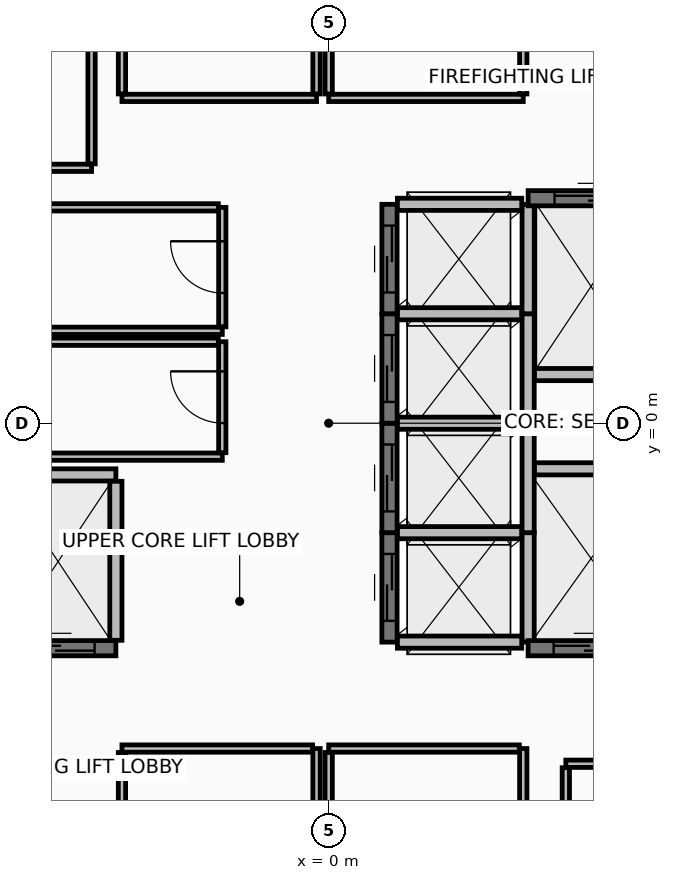
"""IFC4 building model, lengths in metres.
Left out: names, types, materials, properties, quantities, classifications, styles, units other than length and angle.
Written with IfcOpenShell. Run it as: python <this file> out.ifc"""

import sys

from ifc_helpers import new_model, si_unit, direction, frame, frame_2d, origin, place, context, subcontext, project, spatial, rectangle, extrude, element, fill, save


model = new_model("IFC4")
c1 = context("Model", 3, precision=1e-05, world=origin(), true_north=direction((0.0, 1.0)))
c2 = subcontext(c1, "Body", "Model", "MODEL_VIEW")
j1 = project(units=[si_unit("LENGTHUNIT", "METRE"), si_unit("PLANEANGLEUNIT", "RADIAN")], contexts=[c1])
p1 = place(None, origin())
s1 = spatial("IfcSite", under=j1, at=p1, CompositionType="ELEMENT")
p2 = place(p1, origin())
s2 = spatial("IfcBuilding", under=s1, at=p2, CompositionType="ELEMENT")
p3 = place(p2, frame((0.0, 0.0, 294.35)))
s3 = spatial("IfcBuildingStorey", under=s2, at=p3, CompositionType="ELEMENT", Elevation=294.35)
p4 = place(p3, frame((1.0, -3.6, 0.0), z_axis=(0.0, 0.0, 1.0), x_axis=(0.0, 1.0, 0.0)))
e1 = element("IfcWall", 1, at=p4, inside=s3, PredefinedType="SHEAR", context=c2, shape_type="SweptSolid", body=[
    extrude(rectangle(XDim=1.8, YDim=0.25, at=frame_2d((0.9, 0.0))), origin(), (0.0, 0.0, 1.0), 3.45),
])
p5 = place(p4, frame((0.35, 0.0, 0.0)))
e2 = element("IfcOpeningElement", 2, at=p5, cuts=e1, PredefinedType="OPENING", context=c2, shape_type="SweptSolid", body=[
    extrude(rectangle(XDim=1.1, YDim=2.2, at=frame_2d((0.55, 1.1))), frame((0.0, 0.135, 0.0), z_axis=(0.0, -1.0, 0.0), x_axis=(1.0, 0.0, 0.0)), (0.0, 0.0, 1.0), 0.27),
])
p6 = place(p3, frame((3.28, -3.6, 0.0), z_axis=(0.0, 0.0, 1.0), x_axis=(0.0, 1.0, 0.0)))
e3 = element("IfcWall", 3, at=p6, inside=s3, PredefinedType="PARTITIONING", context=c2, shape_type="SweptSolid", body=[
    extrude(rectangle(XDim=1.8, YDim=0.2, at=frame_2d((0.9, 0.0))), origin(), (0.0, 0.0, 1.0), 3.45),
])
for number, where, z_axis, x_axis in (
    (4, (1.13, -3.6, 0.0), (0.0, 0.0, 1.0), (1.0, 0.0, 0.0)),
    (5, (1.13, -1.8, 0.0), (0.0, 0.0, 1.0), (1.0, 0.0, 0.0)),
):
    element("IfcWall", number, at=place(p3, frame(where, z_axis=z_axis, x_axis=x_axis)), inside=s3, PredefinedType="PARTITIONING", context=c2, shape_type="SweptSolid", body=[
        extrude(rectangle(XDim=2.045, YDim=0.2, at=frame_2d((1.022, 0.0))), origin(), (0.0, 0.0, 1.0), 3.45),
    ])
p7 = place(p3, frame((1.0, -1.8, 0.0), z_axis=(0.0, 0.0, 1.0), x_axis=(0.0, 1.0, 0.0)))
e6 = element("IfcWall", 6, at=p7, inside=s3, PredefinedType="SHEAR", context=c2, shape_type="SweptSolid", body=[
    extrude(rectangle(XDim=1.8, YDim=0.25, at=frame_2d((0.9, 0.0))), origin(), (0.0, 0.0, 1.0), 3.45),
])
p8 = place(p7, frame((0.35, 0.0, 0.0)))
e7 = element("IfcOpeningElement", 7, at=p8, cuts=e6, PredefinedType="OPENING", context=c2, shape_type="SweptSolid", body=[
    extrude(rectangle(XDim=1.1, YDim=2.2, at=frame_2d((0.55, 1.1))), frame((0.0, 0.135, 0.0), z_axis=(0.0, -1.0, 0.0), x_axis=(1.0, 0.0, 0.0)), (0.0, 0.0, 1.0), 0.27),
])
p9 = place(p3, frame((3.28, -1.8, 0.0), z_axis=(0.0, 0.0, 1.0), x_axis=(0.0, 1.0, 0.0)))
e8 = element("IfcWall", 8, at=p9, inside=s3, PredefinedType="PARTITIONING", context=c2, shape_type="SweptSolid", body=[
    extrude(rectangle(XDim=1.8, YDim=0.2, at=frame_2d((0.9, 0.0))), origin(), (0.0, 0.0, 1.0), 3.45),
])
p10 = place(p3, frame((1.13, 0.0, 0.0), z_axis=(0.0, 0.0, 1.0), x_axis=(1.0, 0.0, 0.0)))
e9 = element("IfcWall", 9, at=p10, inside=s3, PredefinedType="PARTITIONING", context=c2, shape_type="SweptSolid", body=[
    extrude(rectangle(XDim=2.045, YDim=0.2, at=frame_2d((1.022, 0.0))), origin(), (0.0, 0.0, 1.0), 3.45),
])
p11 = place(p3, frame((1.0, 0.0, 0.0), z_axis=(0.0, 0.0, 1.0), x_axis=(0.0, 1.0, 0.0)))
e10 = element("IfcWall", 10, at=p11, inside=s3, PredefinedType="SHEAR", context=c2, shape_type="SweptSolid", body=[
    extrude(rectangle(XDim=1.8, YDim=0.25, at=frame_2d((0.9, 0.0))), origin(), (0.0, 0.0, 1.0), 3.45),
])
p12 = place(p11, frame((0.35, 0.0, 0.0)))
e11 = element("IfcOpeningElement", 11, at=p12, cuts=e10, PredefinedType="OPENING", context=c2, shape_type="SweptSolid", body=[
    extrude(rectangle(XDim=1.1, YDim=2.2, at=frame_2d((0.55, 1.1))), frame((0.0, 0.135, 0.0), z_axis=(0.0, -1.0, 0.0), x_axis=(1.0, 0.0, 0.0)), (0.0, 0.0, 1.0), 0.27),
])
p13 = place(p3, frame((3.28, 0.0, 0.0), z_axis=(0.0, 0.0, 1.0), x_axis=(0.0, 1.0, 0.0)))
e12 = element("IfcWall", 12, at=p13, inside=s3, PredefinedType="PARTITIONING", context=c2, shape_type="SweptSolid", body=[
    extrude(rectangle(XDim=1.8, YDim=0.2, at=frame_2d((0.9, 0.0))), origin(), (0.0, 0.0, 1.0), 3.45),
])
p14 = place(p3, frame((1.13, 1.8, 0.0), z_axis=(0.0, 0.0, 1.0), x_axis=(1.0, 0.0, 0.0)))
e13 = element("IfcWall", 13, at=p14, inside=s3, PredefinedType="PARTITIONING", context=c2, shape_type="SweptSolid", body=[
    extrude(rectangle(XDim=2.045, YDim=0.2, at=frame_2d((1.022, 0.0))), origin(), (0.0, 0.0, 1.0), 3.45),
])
p15 = place(p3, frame((1.0, 1.8, 0.0), z_axis=(0.0, 0.0, 1.0), x_axis=(0.0, 1.0, 0.0)))
e14 = element("IfcWall", 14, at=p15, inside=s3, PredefinedType="SHEAR", context=c2, shape_type="SweptSolid", body=[
    extrude(rectangle(XDim=1.8, YDim=0.25, at=frame_2d((0.9, 0.0))), origin(), (0.0, 0.0, 1.0), 3.45),
])
p16 = place(p15, frame((0.35, 0.0, 0.0)))
e15 = element("IfcOpeningElement", 15, at=p16, cuts=e14, PredefinedType="OPENING", context=c2, shape_type="SweptSolid", body=[
    extrude(rectangle(XDim=1.1, YDim=2.2, at=frame_2d((0.55, 1.1))), frame((0.0, 0.135, 0.0), z_axis=(0.0, -1.0, 0.0), x_axis=(1.0, 0.0, 0.0)), (0.0, 0.0, 1.0), 0.27),
])
p17 = place(p3, frame((3.28, 1.8, 0.0), z_axis=(0.0, 0.0, 1.0), x_axis=(0.0, 1.0, 0.0)))
e16 = element("IfcWall", 16, at=p17, inside=s3, PredefinedType="PARTITIONING", context=c2, shape_type="SweptSolid", body=[
    extrude(rectangle(XDim=1.8, YDim=0.2, at=frame_2d((0.9, 0.0))), origin(), (0.0, 0.0, 1.0), 3.45),
])
p18 = place(p3, frame((1.13, 3.6, 0.0), z_axis=(0.0, 0.0, 1.0), x_axis=(1.0, 0.0, 0.0)))
e17 = element("IfcWall", 17, at=p18, inside=s3, PredefinedType="PARTITIONING", context=c2, shape_type="SweptSolid", body=[
    extrude(rectangle(XDim=2.045, YDim=0.2, at=frame_2d((1.022, 0.0))), origin(), (0.0, 0.0, 1.0), 2.745),
])
p19 = place(p3, frame((-5.4, -3.7, 0.0), z_axis=(0.0, 0.0, 1.0), x_axis=(1.0, 0.0, 0.0)))
e18 = element("IfcWall", 18, at=p19, inside=s3, PredefinedType="SHEAR", context=c2, shape_type="SweptSolid", body=[
    extrude(rectangle(XDim=1.9, YDim=0.25, at=frame_2d((0.95, 0.0))), origin(), (0.0, 0.0, 1.0), 3.45),
])
p20 = place(p19, frame((0.35, 0.0, 0.0)))
e19 = element("IfcOpeningElement", 19, at=p20, cuts=e18, PredefinedType="OPENING", context=c2, shape_type="SweptSolid", body=[
    extrude(rectangle(XDim=1.2, YDim=2.2, at=frame_2d((0.6, 1.1))), frame((0.0, 0.135, 0.0), z_axis=(0.0, -1.0, 0.0), x_axis=(1.0, 0.0, 0.0)), (0.0, 0.0, 1.0), 0.27),
])
p21 = place(p3, frame((-5.27, -0.85, 0.0), z_axis=(0.0, 0.0, 1.0), x_axis=(1.0, 0.0, 0.0)))
e20 = element("IfcWall", 20, at=p21, inside=s3, PredefinedType="PARTITIONING", context=c2, shape_type="SweptSolid", body=[
    extrude(rectangle(XDim=1.77, YDim=0.2, at=frame_2d((0.885, 0.0))), origin(), (0.0, 0.0, 1.0), 3.45),
])
p22 = place(p3, frame((-3.5, -3.57, 0.0), z_axis=(0.0, 0.0, 1.0), x_axis=(0.0, 1.0, 0.0)))
e21 = element("IfcWall", 21, at=p22, inside=s3, PredefinedType="PARTITIONING", context=c2, shape_type="SweptSolid", body=[
    extrude(rectangle(XDim=2.615, YDim=0.2, at=frame_2d((1.308, 0.0))), origin(), (0.0, 0.0, 1.0), 3.45),
])
p23 = place(p3, frame((3.28, 3.7, 0.0), z_axis=(0.0, 0.0, 1.0), x_axis=(1.0, 0.0, 0.0)))
e22 = element("IfcWall", 22, at=p23, inside=s3, PredefinedType="SHEAR", context=c2, shape_type="SweptSolid", body=[
    extrude(rectangle(XDim=2.07, YDim=0.25, at=frame_2d((1.035, 0.0))), origin(), (0.0, 0.0, 1.0), 3.45),
])
p24 = place(p23, frame((0.435, 0.0, 0.0)))
e23 = element("IfcOpeningElement", 23, at=p24, cuts=e22, PredefinedType="OPENING", context=c2, shape_type="SweptSolid", body=[
    extrude(rectangle(XDim=1.2, YDim=2.2, at=frame_2d((0.6, 1.1))), frame((0.0, 0.135, 0.0), z_axis=(0.0, -1.0, 0.0), x_axis=(1.0, 0.0, 0.0)), (0.0, 0.0, 1.0), 0.27),
])
p25 = place(p3, frame((3.385, 0.8, 0.0), z_axis=(0.0, 0.0, 1.0), x_axis=(1.0, 0.0, 0.0)))
e24 = element("IfcWall", 24, at=p25, inside=s3, PredefinedType="PARTITIONING", context=c2, shape_type="SweptSolid", body=[
    extrude(rectangle(XDim=1.835, YDim=0.2, at=frame_2d((0.917, 0.0))), origin(), (0.0, 0.0, 1.0), 3.45),
])
p26 = place(p3, frame((3.28, -3.7, 0.0), z_axis=(0.0, 0.0, 1.0), x_axis=(1.0, 0.0, 0.0)))
e25 = element("IfcWall", 25, at=p26, inside=s3, PredefinedType="SHEAR", context=c2, shape_type="SweptSolid", body=[
    extrude(rectangle(XDim=1.94, YDim=0.25, at=frame_2d((0.97, 0.0))), origin(), (0.0, 0.0, 1.0), 3.45),
])
p27 = place(p26, frame((0.42, 0.0, 0.0)))
e26 = element("IfcOpeningElement", 26, at=p27, cuts=e25, PredefinedType="OPENING", context=c2, shape_type="SweptSolid", body=[
    extrude(rectangle(XDim=1.1, YDim=2.2, at=frame_2d((0.55, 1.1))), frame((0.0, 0.135, 0.0), z_axis=(0.0, -1.0, 0.0), x_axis=(1.0, 0.0, 0.0)), (0.0, 0.0, 1.0), 0.27),
])
p28 = place(p3, frame((3.385, -0.75, 0.0), z_axis=(0.0, 0.0, 1.0), x_axis=(1.0, 0.0, 0.0)))
e27 = element("IfcWall", 27, at=p28, inside=s3, PredefinedType="PARTITIONING", context=c2, shape_type="SweptSolid", body=[
    extrude(rectangle(XDim=1.835, YDim=0.2, at=frame_2d((0.917, 0.0))), origin(), (0.0, 0.0, 1.0), 3.45),
])
p29 = place(p3, frame((-5.22, 1.52, 0.0), z_axis=(0.0, 0.0, 1.0), x_axis=(1.0, 0.0, 0.0)))
e28 = element("IfcWall", 28, at=p29, inside=s3, PredefinedType="PARTITIONING", context=c2, shape_type="SweptSolid", body=[
    extrude(rectangle(XDim=3.47, YDim=0.12, at=frame_2d((1.735, 0.0))), origin(), (0.0, 0.0, 1.0), 3.45),
])
p30 = place(p3, frame((-1.75, 1.585, 0.0), z_axis=(0.0, 0.0, 1.0), x_axis=(0.0, 1.0, 0.0)))
e29 = element("IfcWall", 29, at=p30, inside=s3, PredefinedType="PARTITIONING", context=c2, shape_type="SweptSolid", body=[
    extrude(rectangle(XDim=1.965, YDim=0.12, at=frame_2d((0.982, 0.0))), origin(), (0.0, 0.0, 1.0), 3.45),
])
p31 = place(p30, frame((0.557, 0.0, 0.0)))
e30 = element("IfcOpeningElement", 30, at=p31, cuts=e29, PredefinedType="OPENING", context=c2, shape_type="SweptSolid", body=[
    extrude(rectangle(XDim=0.85, YDim=2.1, at=frame_2d((0.425, 1.05))), frame((0.0, 0.07, 0.0), z_axis=(0.0, -1.0, 0.0), x_axis=(1.0, 0.0, 0.0)), (0.0, 0.0, 1.0), 0.14),
])
p32 = place(p3, frame((-1.815, 3.55, 0.0), z_axis=(0.0, 0.0, 1.0), x_axis=(-1.0, 0.0, 0.0)))
e31 = element("IfcWall", 31, at=p32, inside=s3, PredefinedType="PARTITIONING", context=c2, shape_type="SweptSolid", body=[
    extrude(rectangle(XDim=3.405, YDim=0.12, at=frame_2d((1.703, 0.0))), origin(), (0.0, 0.0, 1.0), 3.45),
])
p33 = place(p3, frame((-5.22, -0.55, 0.0), z_axis=(0.0, 0.0, 1.0), x_axis=(1.0, 0.0, 0.0)))
e32 = element("IfcWall", 32, at=p33, inside=s3, PredefinedType="PARTITIONING", context=c2, shape_type="SweptSolid", body=[
    extrude(rectangle(XDim=3.47, YDim=0.12, at=frame_2d((1.735, 0.0))), origin(), (0.0, 0.0, 1.0), 3.45),
])
p34 = place(p3, frame((-1.75, -0.485, 0.0), z_axis=(0.0, 0.0, 1.0), x_axis=(0.0, 1.0, 0.0)))
e33 = element("IfcWall", 33, at=p34, inside=s3, PredefinedType="PARTITIONING", context=c2, shape_type="SweptSolid", body=[
    extrude(rectangle(XDim=1.825, YDim=0.12, at=frame_2d((0.913, 0.0))), origin(), (0.0, 0.0, 1.0), 3.45),
])
p35 = place(p34, frame((0.488, 0.0, 0.0)))
e34 = element("IfcOpeningElement", 34, at=p35, cuts=e33, PredefinedType="OPENING", context=c2, shape_type="SweptSolid", body=[
    extrude(rectangle(XDim=0.85, YDim=2.1, at=frame_2d((0.425, 1.05))), frame((0.0, 0.07, 0.0), z_axis=(0.0, -1.0, 0.0), x_axis=(1.0, 0.0, 0.0)), (0.0, 0.0, 1.0), 0.14),
])
p36 = place(p3, frame((-1.815, 1.34, 0.0), z_axis=(0.0, 0.0, 1.0), x_axis=(-1.0, 0.0, 0.0)))
e35 = element("IfcWall", 35, at=p36, inside=s3, PredefinedType="PARTITIONING", context=c2, shape_type="SweptSolid", body=[
    extrude(rectangle(XDim=3.405, YDim=0.12, at=frame_2d((1.703, 0.0))), origin(), (0.0, 0.0, 1.0), 3.45),
])
p37 = place(p3, frame((-0.2, -7.42, 0.0), z_axis=(0.0, 0.0, 1.0), x_axis=(0.0, 1.0, 0.0)))
e36 = element("IfcWall", 36, at=p37, inside=s3, PredefinedType="PARTITIONING", context=c2, shape_type="SweptSolid", body=[
    extrude(rectangle(XDim=2.07, YDim=0.12, at=frame_2d((1.035, 0.0))), origin(), (0.0, 0.0, 1.0), 2.745),
])
p38 = place(p3, frame((-0.265, -5.35, 0.0), z_axis=(0.0, 0.0, 1.0), x_axis=(-1.0, 0.0, 0.0)))
e37 = element("IfcWall", 37, at=p38, inside=s3, PredefinedType="PARTITIONING", context=c2, shape_type="SweptSolid", body=[
    extrude(rectangle(XDim=3.135, YDim=0.12, at=frame_2d((1.567, 0.0))), origin(), (0.0, 0.0, 1.0), 2.745),
])
p39 = place(p3, frame((-3.4, -5.415, 0.0), z_axis=(0.0, 0.0, 1.0), x_axis=(0.0, -1.0, 0.0)))
e38 = element("IfcWall", 38, at=p39, inside=s3, PredefinedType="PARTITIONING", context=c2, shape_type="SweptSolid", body=[
    extrude(rectangle(XDim=2.8, YDim=0.12, at=frame_2d((1.4, 0.0))), origin(), (0.0, 0.0, 1.0), 2.745),
])
p40 = place(p3, frame((3.2, -8.215, 0.0), z_axis=(0.0, 0.0, 1.0), x_axis=(0.0, 1.0, 0.0)))
e39 = element("IfcWall", 39, at=p40, inside=s3, PredefinedType="PARTITIONING", context=c2, shape_type="SweptSolid", body=[
    extrude(rectangle(XDim=2.865, YDim=0.12, at=frame_2d((1.433, 0.0))), origin(), (0.0, 0.0, 1.0), 2.745),
])
p41 = place(p3, frame((3.135, -5.35, 0.0), z_axis=(0.0, 0.0, 1.0), x_axis=(-1.0, 0.0, 0.0)))
e40 = element("IfcWall", 40, at=p41, inside=s3, PredefinedType="PARTITIONING", context=c2, shape_type="SweptSolid", body=[
    extrude(rectangle(XDim=3.135, YDim=0.12, at=frame_2d((1.567, 0.0))), origin(), (0.0, 0.0, 1.0), 3.45),
])
p42 = place(p3, frame((0.0, -5.415, 0.0), z_axis=(0.0, 0.0, 1.0), x_axis=(0.0, -1.0, 0.0)))
e41 = element("IfcWall", 41, at=p42, inside=s3, PredefinedType="PARTITIONING", context=c2, shape_type="SweptSolid", body=[
    extrude(rectangle(XDim=2.005, YDim=0.12, at=frame_2d((1.002, 0.0))), origin(), (0.0, 0.0, 1.0), 2.745),
])
p43 = place(p3, frame((-3.4, 5.35, 0.0), z_axis=(0.0, 0.0, 1.0), x_axis=(1.0, 0.0, 0.0)))
e42 = element("IfcWall", 42, at=p43, inside=s3, PredefinedType="PARTITIONING", context=c2, shape_type="SweptSolid", body=[
    extrude(rectangle(XDim=3.2, YDim=0.12, at=frame_2d((1.6, 0.0))), origin(), (0.0, 0.0, 1.0), 3.45),
])
p44 = place(p3, frame((-0.2, 5.415, 0.0), z_axis=(0.0, 0.0, 1.0), x_axis=(0.0, 1.0, 0.0)))
e43 = element("IfcWall", 43, at=p44, inside=s3, PredefinedType="PARTITIONING", context=c2, shape_type="SweptSolid", body=[
    extrude(rectangle(XDim=2.005, YDim=0.12, at=frame_2d((1.002, 0.0))), origin(), (0.0, 0.0, 1.0), 2.745),
])
p45 = place(p3, frame((-3.4, 8.215, 0.0), z_axis=(0.0, 0.0, 1.0), x_axis=(0.0, -1.0, 0.0)))
e44 = element("IfcWall", 44, at=p45, inside=s3, PredefinedType="PARTITIONING", context=c2, shape_type="SweptSolid", body=[
    extrude(rectangle(XDim=2.8, YDim=0.12, at=frame_2d((1.4, 0.0))), origin(), (0.0, 0.0, 1.0), 2.745),
])
p46 = place(p3, frame((0.0, 5.35, 0.0), z_axis=(0.0, 0.0, 1.0), x_axis=(1.0, 0.0, 0.0)))
e45 = element("IfcWall", 45, at=p46, inside=s3, PredefinedType="PARTITIONING", context=c2, shape_type="SweptSolid", body=[
    extrude(rectangle(XDim=3.2, YDim=0.12, at=frame_2d((1.6, 0.0))), origin(), (0.0, 0.0, 1.0), 2.745),
])
p47 = place(p3, frame((3.2, 5.415, 0.0), z_axis=(0.0, 0.0, 1.0), x_axis=(0.0, 1.0, 0.0)))
e46 = element("IfcWall", 46, at=p47, inside=s3, PredefinedType="PARTITIONING", context=c2, shape_type="SweptSolid", body=[
    extrude(rectangle(XDim=2.8, YDim=0.12, at=frame_2d((1.4, 0.0))), origin(), (0.0, 0.0, 1.0), 2.745),
])
p48 = place(p3, frame((0.0, 7.42, 0.0), z_axis=(0.0, 0.0, 1.0), x_axis=(0.0, -1.0, 0.0)))
e47 = element("IfcWall", 47, at=p48, inside=s3, PredefinedType="PARTITIONING", context=c2, shape_type="SweptSolid", body=[
    extrude(rectangle(XDim=2.005, YDim=0.12, at=frame_2d((1.002, 0.0))), origin(), (0.0, 0.0, 1.0), 2.745),
])
p49 = place(p3, frame((-6.35, 4.2, 0.0), z_axis=(0.0, 0.0, 1.0), x_axis=(1.0, 0.0, 0.0)))
e48 = element("IfcWall", 48, at=p49, inside=s3, PredefinedType="PARTITIONING", context=c2, shape_type="SweptSolid", body=[
    extrude(rectangle(XDim=2.45, YDim=0.12, at=frame_2d((1.225, 0.0))), origin(), (0.0, 0.0, 1.0), 3.45),
])
p50 = place(p3, frame((-3.9, 4.265, 0.0), z_axis=(0.0, 0.0, 1.0), x_axis=(0.0, 1.0, 0.0)))
e49 = element("IfcWall", 49, at=p50, inside=s3, PredefinedType="PARTITIONING", context=c2, shape_type="SweptSolid", body=[
    extrude(rectangle(XDim=3.95, YDim=0.12, at=frame_2d((1.975, 0.0))), origin(), (0.0, 0.0, 1.0), 2.745),
])
p51 = place(p3, frame((5.635, -5.6, 0.0), z_axis=(0.0, 0.0, 1.0), x_axis=(-1.0, 0.0, 0.0)))
e50 = element("IfcWall", 50, at=p51, inside=s3, PredefinedType="PARTITIONING", context=c2, shape_type="SweptSolid", body=[
    extrude(rectangle(XDim=1.735, YDim=0.12, at=frame_2d((0.868, 0.0))), origin(), (0.0, 0.0, 1.0), 3.45),
])
p52 = place(p3, frame((3.9, -5.665, 0.0), z_axis=(0.0, 0.0, 1.0), x_axis=(0.0, -1.0, 0.0)))
e51 = element("IfcWall", 51, at=p52, inside=s3, PredefinedType="PARTITIONING", context=c2, shape_type="SweptSolid", body=[
    extrude(rectangle(XDim=2.55, YDim=0.12, at=frame_2d((1.275, 0.0))), origin(), (0.0, 0.0, 1.0), 2.745),
])
p53 = place(p5, origin())
e52 = element("IfcDoor", 52, at=p53, inside=s3, OperationType="SLIDING_TO_LEFT", PredefinedType="DOOR", context=c2, shape_type="SweptSolid", body=[
    extrude(rectangle(XDim=1.1, YDim=2.2, at=frame_2d((0.55, 1.1))), frame((0.0, 0.025, 0.0), z_axis=(0.0, -1.0, 0.0), x_axis=(1.0, 0.0, 0.0)), (0.0, 0.0, 1.0), 0.05),
])
fill(e2, e52)
p54 = place(p8, origin())
e53 = element("IfcDoor", 53, at=p54, inside=s3, OperationType="SLIDING_TO_LEFT", PredefinedType="DOOR", context=c2, shape_type="SweptSolid", body=[
    extrude(rectangle(XDim=1.1, YDim=2.2, at=frame_2d((0.55, 1.1))), frame((0.0, 0.025, 0.0), z_axis=(0.0, -1.0, 0.0), x_axis=(1.0, 0.0, 0.0)), (0.0, 0.0, 1.0), 0.05),
])
fill(e7, e53)
p55 = place(p12, origin())
e54 = element("IfcDoor", 54, at=p55, inside=s3, OperationType="SLIDING_TO_LEFT", PredefinedType="DOOR", context=c2, shape_type="SweptSolid", body=[
    extrude(rectangle(XDim=1.1, YDim=2.2, at=frame_2d((0.55, 1.1))), frame((0.0, 0.025, 0.0), z_axis=(0.0, -1.0, 0.0), x_axis=(1.0, 0.0, 0.0)), (0.0, 0.0, 1.0), 0.05),
])
fill(e11, e54)
p56 = place(p16, origin())
e55 = element("IfcDoor", 55, at=p56, inside=s3, OperationType="SLIDING_TO_LEFT", PredefinedType="DOOR", context=c2, shape_type="SweptSolid", body=[
    extrude(rectangle(XDim=1.1, YDim=2.2, at=frame_2d((0.55, 1.1))), frame((0.0, 0.025, 0.0), z_axis=(0.0, -1.0, 0.0), x_axis=(1.0, 0.0, 0.0)), (0.0, 0.0, 1.0), 0.05),
])
fill(e15, e55)
p57 = place(p20, origin())
e56 = element("IfcDoor", 56, at=p57, inside=s3, OperationType="SLIDING_TO_RIGHT", PredefinedType="DOOR", context=c2, shape_type="SweptSolid", body=[
    extrude(rectangle(XDim=1.2, YDim=2.2, at=frame_2d((0.6, 1.1))), frame((0.0, 0.025, 0.0), z_axis=(0.0, -1.0, 0.0), x_axis=(1.0, 0.0, 0.0)), (0.0, 0.0, 1.0), 0.05),
])
fill(e19, e56)
p58 = place(p24, origin())
e57 = element("IfcDoor", 57, at=p58, inside=s3, OperationType="SLIDING_TO_RIGHT", PredefinedType="DOOR", context=c2, shape_type="SweptSolid", body=[
    extrude(rectangle(XDim=1.2, YDim=2.2, at=frame_2d((0.6, 1.1))), frame((0.0, 0.025, 0.0), z_axis=(0.0, -1.0, 0.0), x_axis=(1.0, 0.0, 0.0)), (0.0, 0.0, 1.0), 0.05),
])
fill(e23, e57)
p59 = place(p27, origin())
e58 = element("IfcDoor", 58, at=p59, inside=s3, OperationType="SLIDING_TO_LEFT", PredefinedType="DOOR", context=c2, shape_type="SweptSolid", body=[
    extrude(rectangle(XDim=1.1, YDim=2.2, at=frame_2d((0.55, 1.1))), frame((0.0, 0.025, 0.0), z_axis=(0.0, -1.0, 0.0), x_axis=(1.0, 0.0, 0.0)), (0.0, 0.0, 1.0), 0.05),
])
fill(e26, e58)
p60 = place(p31, frame((0.85, 0.0, 0.0), z_axis=(0.0, 0.0, 1.0), x_axis=(-1.0, 0.0, 0.0)))
e59 = element("IfcDoor", 59, at=p60, inside=s3, OperationType="SINGLE_SWING_RIGHT", PredefinedType="DOOR", context=c2, shape_type="SweptSolid", body=[
    extrude(rectangle(XDim=0.85, YDim=2.1, at=frame_2d((0.425, 1.05))), frame((0.0, 0.025, 0.0), z_axis=(0.0, -1.0, 0.0), x_axis=(1.0, 0.0, 0.0)), (0.0, 0.0, 1.0), 0.05),
])
fill(e30, e59)
p61 = place(p35, frame((0.85, 0.0, 0.0), z_axis=(0.0, 0.0, 1.0), x_axis=(-1.0, 0.0, 0.0)))
e60 = element("IfcDoor", 60, at=p61, inside=s3, OperationType="SINGLE_SWING_RIGHT", PredefinedType="DOOR", context=c2, shape_type="SweptSolid", body=[
    extrude(rectangle(XDim=0.85, YDim=2.1, at=frame_2d((0.425, 1.05))), frame((0.0, 0.025, 0.0), z_axis=(0.0, -1.0, 0.0), x_axis=(1.0, 0.0, 0.0)), (0.0, 0.0, 1.0), 0.05),
])
fill(e34, e60)
save(model, sys.argv[1])
